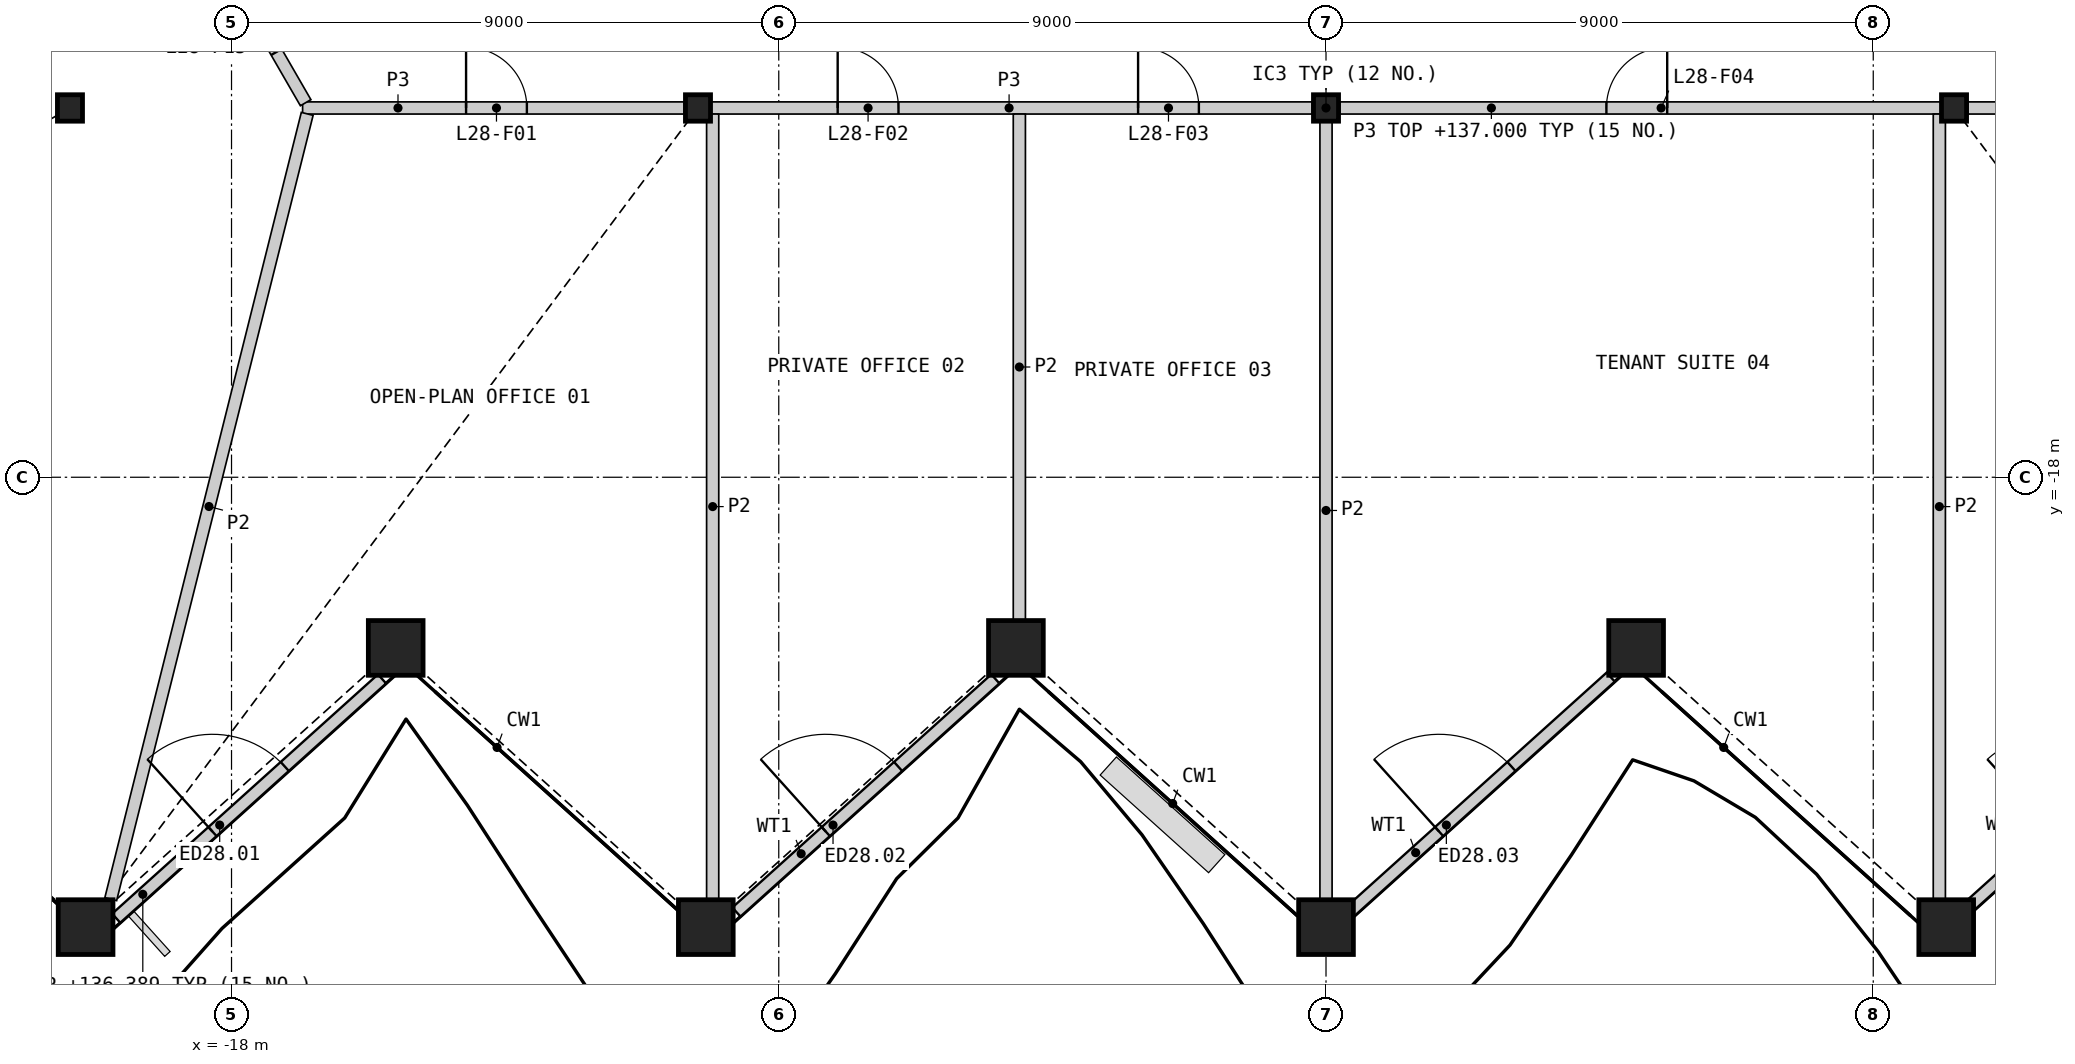
"""IFC4 building model, lengths in metres.
Left out: names, types, materials, properties, quantities, classifications, styles, units other than length and angle.
Written with IfcOpenShell. Run it as: python <this file> out.ifc"""

import sys

from ifc_helpers import new_model, si_unit, direction, frame, frame_2d, origin, origin_2d, place, context, subcontext, project, spatial, rectangle, hollow_rectangle, i_section, extrude, element, fill, save


model = new_model("IFC4")
c1 = context("Model", 3, precision=1e-05, world=origin(), true_north=direction((0.0, 1.0)))
c2 = subcontext(c1, "Body", "Model", "MODEL_VIEW")
j1 = project(units=[si_unit("LENGTHUNIT", "METRE"), si_unit("PLANEANGLEUNIT", "RADIAN")], contexts=[c1])
p1 = place(None, origin())
s1 = spatial("IfcSite", under=j1, at=p1, CompositionType="ELEMENT")
p2 = place(p1, origin())
s2 = spatial("IfcBuilding", under=s1, at=p2, CompositionType="ELEMENT")
p3 = place(p2, frame((0.0, 0.0, 133.2)))
s3 = spatial("IfcBuildingStorey", under=s2, at=p3, CompositionType="ELEMENT", Elevation=133.2)
for number, where, z_axis, x_axis in (
    (1, (-20.4, -25.399, 0.0), (0.0, 0.0, 1.0), (1.0, 0.0, 0.0)),
    (2, (-15.3, -20.807, 0.0), (0.0, 0.0, 1.0), (1.0, 0.0, 0.0)),
    (3, (-10.2, -25.399, 0.0), (0.0, 0.0, 1.0), (1.0, 0.0, 0.0)),
    (4, (-5.1, -20.807, 0.0), (0.0, 0.0, 1.0), (1.0, 0.0, 0.0)),
    (5, (0.0, -25.399, 0.0), (0.0, 0.0, 1.0), (1.0, 0.0, 0.0)),
    (6, (5.1, -20.807, 0.0), (0.0, 0.0, 1.0), (1.0, 0.0, 0.0)),
    (7, (10.2, -25.399, 0.0), (0.0, 0.0, 1.0), (1.0, 0.0, 0.0)),
):
    element("IfcColumn", number, at=place(p3, frame(where, z_axis=z_axis, x_axis=x_axis)), inside=s3, PredefinedType="COLUMN", context=c2, shape_type="SweptSolid", body=[
        extrude(hollow_rectangle(XDim=0.9, YDim=0.9, WallThickness=0.06, at=origin_2d()), origin(), (0.0, 0.0, 1.0), 4.2),
    ])
for number, where, z_axis, x_axis in (
    (8, (-20.657, -11.926, 0.0), (0.0, 0.0, 1.0), (1.0, 0.0, 0.0)),
    (9, (-10.328, -11.926, 0.0), (0.0, 0.0, 1.0), (1.0, 0.0, 0.0)),
    (10, (0.0, -11.926, 0.0), (0.0, 0.0, 1.0), (1.0, 0.0, 0.0)),
    (11, (10.328, -11.926, 0.0), (0.0, 0.0, 1.0), (1.0, 0.0, 0.0)),
):
    element("IfcColumn", number, at=place(p3, frame(where, z_axis=z_axis, x_axis=x_axis)), inside=s3, PredefinedType="COLUMN", context=c2, shape_type="SweptSolid", body=[
        extrude(i_section(OverallWidth=0.412, OverallDepth=0.435, WebThickness=0.036, FlangeThickness=0.057, at=origin_2d()), origin(), (0.0, 0.0, 1.0), 4.2),
    ])
p4 = place(p3, frame((-19.896, -25.253, 0.0), z_axis=(0.0, 0.0, 1.0), x_axis=(0.743157926671, 0.669116055723, 0.0)))
e12 = element("IfcWall", 12, at=p4, inside=s3, PredefinedType="SOLIDWALL", context=c2, shape_type="SweptSolid", body=[
    extrude(rectangle(XDim=5.882, YDim=0.2, at=frame_2d((2.941, 0.0))), origin(), (0.0, 0.0, 1.0), 3.189),
])
p5 = place(p4, frame((2.13, 0.0, 0.0)))
e13 = element("IfcOpeningElement", 13, at=p5, cuts=e12, PredefinedType="OPENING", context=c2, shape_type="SweptSolid", body=[
    extrude(rectangle(XDim=1.6, YDim=2.4, at=frame_2d((0.8, 1.2))), frame((0.0, 0.11, 0.0), z_axis=(0.0, -1.0, 0.0), x_axis=(1.0, 0.0, 0.0)), (0.0, 0.0, 1.0), 0.22),
])
p6 = place(p3, frame((-9.696, -25.151, 0.0), z_axis=(0.0, 0.0, 1.0), x_axis=(0.743141591148, 0.669134198428, 0.0)))
e14 = element("IfcWall", 14, at=p6, inside=s3, PredefinedType="SOLIDWALL", context=c2, shape_type="SweptSolid", body=[
    extrude(rectangle(XDim=5.73, YDim=0.2, at=frame_2d((2.865, 0.0))), origin(), (0.0, 0.0, 1.0), 3.189),
])
p7 = place(p6, frame((1.978, 0.0, 0.0)))
e15 = element("IfcOpeningElement", 15, at=p7, cuts=e14, PredefinedType="OPENING", context=c2, shape_type="SweptSolid", body=[
    extrude(rectangle(XDim=1.6, YDim=2.4, at=frame_2d((0.8, 1.2))), frame((0.0, 0.11, 0.0), z_axis=(0.0, -1.0, 0.0), x_axis=(1.0, 0.0, 0.0)), (0.0, 0.0, 1.0), 0.22),
])
p8 = place(p3, frame((0.406, -25.137, 0.0), z_axis=(0.0, 0.0, 1.0), x_axis=(0.743135897471, 0.669140521782, 0.0)))
e16 = element("IfcWall", 16, at=p8, inside=s3, PredefinedType="SOLIDWALL", context=c2, shape_type="SweptSolid", body=[
    extrude(rectangle(XDim=5.754, YDim=0.2, at=frame_2d((2.877, 0.0))), origin(), (0.0, 0.0, 1.0), 3.189),
])
p9 = place(p8, frame((1.957, 0.0, 0.0)))
e17 = element("IfcOpeningElement", 17, at=p9, cuts=e16, PredefinedType="OPENING", context=c2, shape_type="SweptSolid", body=[
    extrude(rectangle(XDim=1.6, YDim=2.4, at=frame_2d((0.8, 1.2))), frame((0.0, 0.11, 0.0), z_axis=(0.0, -1.0, 0.0), x_axis=(1.0, 0.0, 0.0)), (0.0, 0.0, 1.0), 0.22),
])
p10 = place(p3, frame((10.492, -25.137, 0.0), z_axis=(0.0, 0.0, 1.0), x_axis=(0.743136230799, 0.669140151593, 0.0)))
e18 = element("IfcWall", 18, at=p10, inside=s3, PredefinedType="SOLIDWALL", context=c2, shape_type="SweptSolid", body=[
    extrude(rectangle(XDim=5.843, YDim=0.2, at=frame_2d((2.922, 0.0))), origin(), (0.0, 0.0, 1.0), 3.189),
])
p11 = place(p10, frame((1.957, 0.0, 0.0)))
e19 = element("IfcOpeningElement", 19, at=p11, cuts=e18, PredefinedType="OPENING", context=c2, shape_type="SweptSolid", body=[
    extrude(rectangle(XDim=1.6, YDim=2.4, at=frame_2d((0.8, 1.2))), frame((0.0, 0.11, 0.0), z_axis=(0.0, -1.0, 0.0), x_axis=(1.0, 0.0, 0.0)), (0.0, 0.0, 1.0), 0.22),
])
p12 = place(p3, frame((0.227, -11.926, 0.0), z_axis=(0.0, 0.0, 1.0), x_axis=(1.0, 0.0, 0.0)))
e20 = element("IfcWall", 20, at=p12, inside=s3, PredefinedType="PARTITIONING", context=c2, shape_type="SweptSolid", body=[
    extrude(rectangle(XDim=9.969, YDim=0.2, at=frame_2d((4.985, 0.0))), origin(), (0.0, 0.0, 1.0), 3.8),
])
p13 = place(p12, frame((4.384, 0.0, 0.0)))
e21 = element("IfcOpeningElement", 21, at=p13, cuts=e20, PredefinedType="OPENING", context=c2, shape_type="SweptSolid", body=[
    extrude(rectangle(XDim=1.0, YDim=2.1, at=frame_2d((0.5, 1.05))), frame((0.0, 0.11, 0.0), z_axis=(0.0, -1.0, 0.0), x_axis=(1.0, 0.0, 0.0)), (0.0, 0.0, 1.0), 0.22),
])
p14 = place(p3, frame((-10.197, -11.926, 0.0), z_axis=(0.0, 0.0, 1.0), x_axis=(1.0, 0.0, 0.0)))
e22 = element("IfcWall", 22, at=p14, inside=s3, PredefinedType="PARTITIONING", context=c2, shape_type="SweptSolid", body=[
    extrude(rectangle(XDim=9.969, YDim=0.2, at=frame_2d((4.985, 0.0))), origin(), (0.0, 0.0, 1.0), 3.8),
])
p15 = place(p14, frame((2.166, 0.0, 0.0)))
e23 = element("IfcOpeningElement", 23, at=p15, cuts=e22, PredefinedType="OPENING", context=c2, shape_type="SweptSolid", body=[
    extrude(rectangle(XDim=1.0, YDim=2.1, at=frame_2d((0.5, 1.05))), frame((0.0, 0.11, 0.0), z_axis=(0.0, -1.0, 0.0), x_axis=(1.0, 0.0, 0.0)), (0.0, 0.0, 1.0), 0.22),
])
p16 = place(p14, frame((7.106, 0.0, 0.0)))
e24 = element("IfcOpeningElement", 24, at=p16, cuts=e22, PredefinedType="OPENING", context=c2, shape_type="SweptSolid", body=[
    extrude(rectangle(XDim=1.0, YDim=2.1, at=frame_2d((0.5, 1.05))), frame((0.0, 0.11, 0.0), z_axis=(0.0, -1.0, 0.0), x_axis=(1.0, 0.0, 0.0)), (0.0, 0.0, 1.0), 0.22),
])
p17 = place(p3, frame((-16.831, -11.926, 0.0), z_axis=(0.0, 0.0, 1.0), x_axis=(1.0, 0.0, 0.0)))
e25 = element("IfcWall", 25, at=p17, inside=s3, PredefinedType="PARTITIONING", context=c2, shape_type="SweptSolid", body=[
    extrude(rectangle(XDim=6.275, YDim=0.2, at=frame_2d((3.137, 0.0))), origin(), (0.0, 0.0, 1.0), 3.8),
])
p18 = place(p17, frame((2.688, 0.0, 0.0)))
e26 = element("IfcOpeningElement", 26, at=p18, cuts=e25, PredefinedType="OPENING", context=c2, shape_type="SweptSolid", body=[
    extrude(rectangle(XDim=1.0, YDim=2.1, at=frame_2d((0.5, 1.05))), frame((0.0, 0.11, 0.0), z_axis=(0.0, -1.0, 0.0), x_axis=(1.0, 0.0, 0.0)), (0.0, 0.0, 1.0), 0.22),
])
p19 = place(p3, frame((10.556, -11.926, 0.0), z_axis=(0.0, 0.0, 1.0), x_axis=(1.0, 0.0, 0.0)))
e27 = element("IfcWall", 27, at=p19, inside=s3, PredefinedType="PARTITIONING", context=c2, shape_type="SweptSolid", body=[
    extrude(rectangle(XDim=6.275, YDim=0.2, at=frame_2d((3.137, 0.0))), origin(), (0.0, 0.0, 1.0), 3.8),
])
p20 = place(p19, frame((2.587, 0.0, 0.0)))
e28 = element("IfcOpeningElement", 28, at=p20, cuts=e27, PredefinedType="OPENING", context=c2, shape_type="SweptSolid", body=[
    extrude(rectangle(XDim=1.0, YDim=2.1, at=frame_2d((0.5, 1.05))), frame((0.0, 0.11, 0.0), z_axis=(0.0, -1.0, 0.0), x_axis=(1.0, 0.0, 0.0)), (0.0, 0.0, 1.0), 0.22),
])
p21 = place(p3, frame((-18.644, -8.613, 0.0), z_axis=(0.0, 0.0, 1.0), x_axis=(0.499958791762, -0.866049194065, 0.0)))
e29 = element("IfcWall", 29, at=p21, inside=s3, PredefinedType="PARTITIONING", context=c2, shape_type="SweptSolid", body=[
    extrude(rectangle(XDim=3.726, YDim=0.2, at=frame_2d((1.863, 0.0))), origin(), (0.0, 0.0, 1.0), 3.8),
])
p22 = place(p21, frame((0.963, 0.0, 0.0)))
e30 = element("IfcOpeningElement", 30, at=p22, cuts=e29, PredefinedType="OPENING", context=c2, shape_type="SweptSolid", body=[
    extrude(rectangle(XDim=1.8, YDim=2.1, at=frame_2d((0.9, 1.05))), frame((0.0, 0.11, 0.0), z_axis=(0.0, -1.0, 0.0), x_axis=(1.0, 0.0, 0.0)), (0.0, 0.0, 1.0), 0.22),
])
p23 = place(p3, frame((-19.987, -24.939, 0.0), z_axis=(0.0, 0.0, 1.0), x_axis=(0.242708204495, 0.97009933897, 0.0)))
e31 = element("IfcWall", 31, at=p23, inside=s3, PredefinedType="PARTITIONING", context=c2, shape_type="SweptSolid", body=[
    extrude(rectangle(XDim=13.314, YDim=0.2, at=frame_2d((6.657, 0.0))), origin(), (0.0, 0.0, 1.0), 2.885),
])
for number, where, z_axis, x_axis in (
    (32, (-10.087, -24.939, 0.0), (0.0, 0.0, 1.0), (0.0, 1.0, 0.0)),
    (33, (10.087, -24.939, 0.0), (0.0, 0.0, 1.0), (0.0, 1.0, 0.0)),
):
    element("IfcWall", number, at=place(p3, frame(where, z_axis=z_axis, x_axis=x_axis)), inside=s3, PredefinedType="PARTITIONING", context=c2, shape_type="SweptSolid", body=[
        extrude(rectangle(XDim=12.913, YDim=0.2, at=frame_2d((6.457, 0.0))), origin(), (0.0, 0.0, 1.0), 2.885),
    ])
p24 = place(p3, frame((0.0, -24.939, 0.0), z_axis=(0.0, 0.0, 1.0), x_axis=(0.0, 1.0, 0.0)))
e34 = element("IfcWall", 34, at=p24, inside=s3, PredefinedType="PARTITIONING", context=c2, shape_type="SweptSolid", body=[
    extrude(rectangle(XDim=12.785, YDim=0.2, at=frame_2d((6.393, 0.0))), origin(), (0.0, 0.0, 1.0), 2.885),
])
p25 = place(p3, frame((-5.043, -20.347, 0.0), z_axis=(0.0, 0.0, 1.0), x_axis=(0.0, 1.0, 0.0)))
e35 = element("IfcWall", 35, at=p25, inside=s3, PredefinedType="PARTITIONING", context=c2, shape_type="SweptSolid", body=[
    extrude(rectangle(XDim=8.321, YDim=0.2, at=frame_2d((4.16, 0.0))), origin(), (0.0, 0.0, 1.0), 2.885),
])
p26 = place(p5, origin())
e36 = element("IfcDoor", 36, at=p26, inside=s3, OperationType="DOUBLE_DOOR_SINGLE_SWING", PredefinedType="DOOR", context=c2, shape_type="SweptSolid", body=[
    extrude(rectangle(XDim=1.6, YDim=2.4, at=frame_2d((0.8, 1.2))), frame((0.0, 0.025, 0.0), z_axis=(0.0, -1.0, 0.0), x_axis=(1.0, 0.0, 0.0)), (0.0, 0.0, 1.0), 0.05),
])
fill(e13, e36)
p27 = place(p7, origin())
e37 = element("IfcDoor", 37, at=p27, inside=s3, OperationType="DOUBLE_DOOR_SINGLE_SWING", PredefinedType="DOOR", context=c2, shape_type="SweptSolid", body=[
    extrude(rectangle(XDim=1.6, YDim=2.4, at=frame_2d((0.8, 1.2))), frame((0.0, 0.025, 0.0), z_axis=(0.0, -1.0, 0.0), x_axis=(1.0, 0.0, 0.0)), (0.0, 0.0, 1.0), 0.05),
])
fill(e15, e37)
p28 = place(p9, origin())
e38 = element("IfcDoor", 38, at=p28, inside=s3, OperationType="DOUBLE_DOOR_SINGLE_SWING", PredefinedType="DOOR", context=c2, shape_type="SweptSolid", body=[
    extrude(rectangle(XDim=1.6, YDim=2.4, at=frame_2d((0.8, 1.2))), frame((0.0, 0.025, 0.0), z_axis=(0.0, -1.0, 0.0), x_axis=(1.0, 0.0, 0.0)), (0.0, 0.0, 1.0), 0.05),
])
fill(e17, e38)
p29 = place(p18, origin())
e39 = element("IfcDoor", 39, at=p29, inside=s3, OperationType="SINGLE_SWING_LEFT", PredefinedType="DOOR", context=c2, shape_type="SweptSolid", body=[
    extrude(rectangle(XDim=1.0, YDim=2.1, at=frame_2d((0.5, 1.05))), frame((0.0, 0.025, 0.0), z_axis=(0.0, -1.0, 0.0), x_axis=(1.0, 0.0, 0.0)), (0.0, 0.0, 1.0), 0.05),
])
fill(e26, e39)
p30 = place(p15, origin())
e40 = element("IfcDoor", 40, at=p30, inside=s3, OperationType="SINGLE_SWING_LEFT", PredefinedType="DOOR", context=c2, shape_type="SweptSolid", body=[
    extrude(rectangle(XDim=1.0, YDim=2.1, at=frame_2d((0.5, 1.05))), frame((0.0, 0.025, 0.0), z_axis=(0.0, -1.0, 0.0), x_axis=(1.0, 0.0, 0.0)), (0.0, 0.0, 1.0), 0.05),
])
fill(e23, e40)
p31 = place(p16, origin())
e41 = element("IfcDoor", 41, at=p31, inside=s3, OperationType="SINGLE_SWING_LEFT", PredefinedType="DOOR", context=c2, shape_type="SweptSolid", body=[
    extrude(rectangle(XDim=1.0, YDim=2.1, at=frame_2d((0.5, 1.05))), frame((0.0, 0.025, 0.0), z_axis=(0.0, -1.0, 0.0), x_axis=(1.0, 0.0, 0.0)), (0.0, 0.0, 1.0), 0.05),
])
fill(e24, e41)
p32 = place(p13, origin())
e42 = element("IfcDoor", 42, at=p32, inside=s3, OperationType="SINGLE_SWING_RIGHT", PredefinedType="DOOR", context=c2, shape_type="SweptSolid", body=[
    extrude(rectangle(XDim=1.0, YDim=2.1, at=frame_2d((0.5, 1.05))), frame((0.0, 0.025, 0.0), z_axis=(0.0, -1.0, 0.0), x_axis=(1.0, 0.0, 0.0)), (0.0, 0.0, 1.0), 0.05),
])
fill(e21, e42)
p33 = place(p22, origin())
e43 = element("IfcDoor", 43, at=p33, inside=s3, OperationType="DOUBLE_DOOR_SINGLE_SWING", PredefinedType="DOOR", context=c2, shape_type="SweptSolid", body=[
    extrude(rectangle(XDim=1.8, YDim=2.1, at=frame_2d((0.9, 1.05))), frame((0.0, 0.025, 0.0), z_axis=(0.0, -1.0, 0.0), x_axis=(1.0, 0.0, 0.0)), (0.0, 0.0, 1.0), 0.05),
])
fill(e30, e43)
save(model, sys.argv[1])
